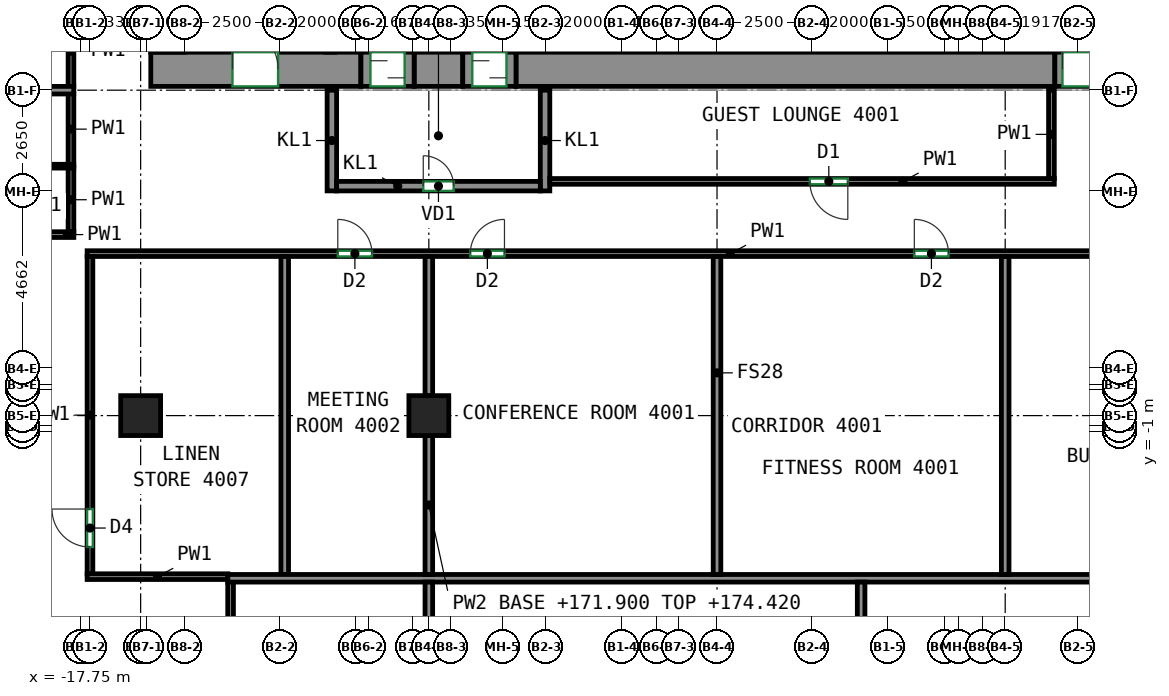
"""IFC4 building model, lengths in metres.
Left out: names, types, materials, properties, quantities, classifications, styles, units other than length and angle.
Written with IfcOpenShell. Run it as: python <this file> out.ifc"""

import sys

from ifc_helpers import new_model, si_unit, direction, frame, frame_2d, origin, origin_2d, place, context, subcontext, project, spatial, rectangle, extrude, source, transform, mapped, element, fill, save


model = new_model("IFC4")
c1 = context("Model", 3, precision=1e-05, world=origin(), true_north=direction((0.0, 1.0)))
c2 = subcontext(c1, "Body", "Model", "MODEL_VIEW")
j1 = project(units=[si_unit("LENGTHUNIT", "METRE"), si_unit("PLANEANGLEUNIT", "RADIAN")], contexts=[c1])
p1 = place(None, origin())
s1 = spatial("IfcSite", under=j1, at=p1, CompositionType="ELEMENT")
p2 = place(p1, origin())
s2 = spatial("IfcBuilding", under=s1, at=p2, CompositionType="ELEMENT")
p3 = place(p2, frame((0.0, 0.0, 171.9)))
s3 = spatial("IfcBuildingStorey", under=s2, at=p3, CompositionType="ELEMENT", Elevation=171.9)
m1 = source(origin(), c2, "Body", "SweptSolid", [
    extrude(rectangle(XDim=1.05, YDim=1.05, at=origin_2d()), origin(), (0.0, 0.0, 1.0), 3.12),
])
for number, where, z_axis, x_axis in (
    (1, (-16.167, -0.562, 0.0), (0.0, 0.0, 1.0), (1.0, 0.0, 0.0)),
    (2, (-8.583, -0.562, 0.0), (0.0, 0.0, 1.0), (1.0, 0.0, 0.0)),
):
    element("IfcColumn", number, at=place(p3, frame(where, z_axis=z_axis, x_axis=x_axis)), inside=s3, PredefinedType="COLUMN", context=c2, shape_type="MappedRepresentation", body=[
        mapped(m1, transform((0.0, 0.0, 0.0))),
    ])
m2 = source(origin(), c2, "Body", "SweptSolid", [
    extrude(rectangle(XDim=5.53, YDim=0.9, at=frame_2d((2.765, 0.0))), origin(), (0.0, 0.0, 1.0), 3.12),
])
p4 = place(p3, frame((-15.9, 8.55, 0.0), z_axis=(0.0, 0.0, 1.0), x_axis=(1.0, 0.0, 0.0)))
e3 = element("IfcWall", 3, at=p4, inside=s3, PredefinedType="SHEAR", context=c2, shape_type="MappedRepresentation", body=[
    mapped(m2, transform((0.0, 0.0, 0.0))),
])
p5 = place(p4, frame((2.15, 0.0, 0.0)))
e4 = element("IfcOpeningElement", 4, at=p5, cuts=e3, PredefinedType="OPENING", context=c2, shape_type="SweptSolid", body=[
    extrude(rectangle(XDim=1.2, YDim=2.1, at=frame_2d((0.6, 1.05))), frame((0.0, 0.46, 0.0), z_axis=(0.0, -1.0, 0.0), x_axis=(1.0, 0.0, 0.0)), (0.0, 0.0, 1.0), 0.92),
])
m3 = source(origin(), c2, "Body", "SweptSolid", [
    extrude(rectangle(XDim=1.28, YDim=0.9, at=frame_2d((0.64, 0.0))), origin(), (0.0, 0.0, 1.0), 3.12),
])
p6 = place(p3, frame((-8.97, 8.55, 0.0), z_axis=(0.0, 0.0, 1.0), x_axis=(1.0, 0.0, 0.0)))
e5 = element("IfcWall", 5, at=p6, inside=s3, PredefinedType="SHEAR", context=c2, shape_type="MappedRepresentation", body=[
    mapped(m3, transform((0.0, 0.0, 0.0))),
])
m4 = source(origin(), c2, "Body", "SweptSolid", [
    extrude(rectangle(XDim=14.18, YDim=0.9, at=frame_2d((7.09, 0.0))), origin(), (0.0, 0.0, 1.0), 3.12),
])
p7 = place(p3, frame((-6.29, 8.55, 0.0), z_axis=(0.0, 0.0, 1.0), x_axis=(1.0, 0.0, 0.0)))
e6 = element("IfcWall", 6, at=p7, inside=s3, PredefinedType="SHEAR", context=c2, shape_type="MappedRepresentation", body=[
    mapped(m4, transform((0.0, 0.0, 0.0))),
])
m5 = source(origin(), c2, "Body", "SweptSolid", [
    extrude(rectangle(XDim=2.65, YDim=0.25, at=frame_2d((1.325, 0.0))), origin(), (0.0, 0.0, 1.0), 3.12),
])
for number, where, z_axis, x_axis in (
    (7, (-11.135, 5.35, 0.0), (0.0, 0.0, 1.0), (0.0, 1.0, 0.0)),
    (8, (-5.525, 5.35, 0.0), (0.0, 0.0, 1.0), (0.0, 1.0, 0.0)),
):
    element("IfcWall", number, at=place(p3, frame(where, z_axis=z_axis, x_axis=x_axis)), inside=s3, PredefinedType="PARTITIONING", context=c2, shape_type="MappedRepresentation", body=[
        mapped(m5, transform((0.0, 0.0, 0.0))),
    ])
m6 = source(origin(), c2, "Body", "SweptSolid", [
    extrude(rectangle(XDim=5.36, YDim=0.25, at=frame_2d((2.68, 0.0))), origin(), (0.0, 0.0, 1.0), 3.12),
])
p8 = place(p3, frame((-11.01, 5.475, 0.0), z_axis=(0.0, 0.0, 1.0), x_axis=(1.0, 0.0, 0.0)))
e9 = element("IfcWall", 9, at=p8, inside=s3, PredefinedType="PARTITIONING", context=c2, shape_type="MappedRepresentation", body=[
    mapped(m6, transform((0.0, 0.0, 0.0))),
])
p9 = place(p8, frame((2.28, 0.0, 0.0)))
e10 = element("IfcOpeningElement", 10, at=p9, cuts=e9, PredefinedType="OPENING", context=c2, shape_type="SweptSolid", body=[
    extrude(rectangle(XDim=0.8, YDim=2.0, at=frame_2d((0.4, 1.0))), frame((0.0, 0.135, 0.0), z_axis=(0.0, -1.0, 0.0), x_axis=(1.0, 0.0, 0.0)), (0.0, 0.0, 1.0), 0.27),
])
m7 = source(origin(), c2, "Body", "SweptSolid", [
    extrude(rectangle(XDim=1.4, YDim=0.9, at=frame_2d((0.7, 0.0))), origin(), (0.0, 0.0, 1.0), 2.7),
])
p10 = place(p3, frame((-10.37, 8.55, 0.0), z_axis=(0.0, 0.0, 1.0), x_axis=(1.0, 0.0, 0.0)))
e11 = element("IfcWall", 11, at=p10, inside=s3, PredefinedType="PARTITIONING", context=c2, shape_type="MappedRepresentation", body=[
    mapped(m7, transform((0.0, 0.0, 0.0))),
])
p11 = place(p10, frame((0.25, 0.0, 0.0)))
e12 = element("IfcOpeningElement", 12, at=p11, cuts=e11, PredefinedType="OPENING", context=c2, shape_type="SweptSolid", body=[
    extrude(rectangle(XDim=0.9, YDim=2.1, at=frame_2d((0.45, 1.05))), frame((0.0, 0.46, 0.0), z_axis=(0.0, -1.0, 0.0), x_axis=(1.0, 0.0, 0.0)), (0.0, 0.0, 1.0), 0.92),
])
m8 = source(origin(), c2, "Body", "SweptSolid", [
    extrude(rectangle(XDim=1.4, YDim=0.9, at=frame_2d((0.7, 0.0))), origin(), (0.0, 0.0, 1.0), 2.7),
])
p12 = place(p3, frame((-7.69, 8.55, 0.0), z_axis=(0.0, 0.0, 1.0), x_axis=(1.0, 0.0, 0.0)))
e13 = element("IfcWall", 13, at=p12, inside=s3, PredefinedType="PARTITIONING", context=c2, shape_type="MappedRepresentation", body=[
    mapped(m8, transform((0.0, 0.0, 0.0))),
])
p13 = place(p12, frame((0.25, 0.0, 0.0)))
e14 = element("IfcOpeningElement", 14, at=p13, cuts=e13, PredefinedType="OPENING", context=c2, shape_type="SweptSolid", body=[
    extrude(rectangle(XDim=0.9, YDim=2.1, at=frame_2d((0.45, 1.05))), frame((0.0, 0.46, 0.0), z_axis=(0.0, -1.0, 0.0), x_axis=(1.0, 0.0, 0.0)), (0.0, 0.0, 1.0), 0.92),
])
m9 = source(origin(), c2, "Body", "SweptSolid", [
    extrude(rectangle(XDim=2.4, YDim=0.9, at=frame_2d((1.2, 0.0))), origin(), (0.0, 0.0, 1.0), 2.7),
])
p14 = place(p3, frame((7.89, 8.55, 0.0), z_axis=(0.0, 0.0, 1.0), x_axis=(1.0, 0.0, 0.0)))
e15 = element("IfcWall", 15, at=p14, inside=s3, PredefinedType="PARTITIONING", context=c2, shape_type="MappedRepresentation", body=[
    mapped(m9, transform((0.0, 0.0, 0.0))),
])
p15 = place(p14, frame((0.2, 0.0, 0.0)))
e16 = element("IfcOpeningElement", 16, at=p15, cuts=e15, PredefinedType="OPENING", context=c2, shape_type="SweptSolid", body=[
    extrude(rectangle(XDim=2.0, YDim=2.1, at=frame_2d((1.0, 1.05))), frame((0.0, 0.46, 0.0), z_axis=(0.0, -1.0, 0.0), x_axis=(1.0, 0.0, 0.0)), (0.0, 0.0, 1.0), 0.92),
])
p16 = place(p3, frame((-17.925, 4.2, 0.0), z_axis=(0.0, 0.0, 1.0), x_axis=(-1.0, 0.0, 0.0)))
e17 = element("IfcWall", 17, at=p16, inside=s3, PredefinedType="PARTITIONING", context=c2, shape_type="SweptSolid", body=[
    extrude(rectangle(XDim=2.109, YDim=0.15, at=frame_2d((1.054, 0.0))), origin(), (0.0, 0.0, 1.0), 3.12),
])
p17 = place(p16, frame((0.706, 0.0, 0.0)))
e18 = element("IfcOpeningElement", 18, at=p17, cuts=e17, PredefinedType="OPENING", context=c2, shape_type="SweptSolid", body=[
    extrude(rectangle(XDim=1.0, YDim=2.1, at=frame_2d((0.5, 1.05))), frame((0.0, 0.085, 0.0), z_axis=(0.0, -1.0, 0.0), x_axis=(1.0, 0.0, 0.0)), (0.0, 0.0, 1.0), 0.17),
])
p18 = place(p3, frame((-18.0, 4.275, 0.0), z_axis=(0.0, 0.0, 1.0), x_axis=(0.0, 1.0, 0.0)))
e19 = element("IfcWall", 19, at=p18, inside=s3, PredefinedType="PARTITIONING", context=c2, shape_type="SweptSolid", body=[
    extrude(rectangle(XDim=1.685, YDim=0.15, at=frame_2d((0.843, 0.0))), origin(), (0.0, 0.0, 1.0), 3.12),
])
for number, where, z_axis, x_axis in (
    (20, (-18.0, 6.04, 0.0), (0.0, 0.0, 1.0), (0.0, 1.0, 0.0)),
    (21, (-18.0, 8.09, 0.0), (0.0, 0.0, 1.0), (0.0, 1.0, 0.0)),
):
    element("IfcWall", number, at=place(p3, frame(where, z_axis=z_axis, x_axis=x_axis)), inside=s3, PredefinedType="PARTITIONING", context=c2, shape_type="SweptSolid", body=[
        extrude(rectangle(XDim=1.87, YDim=0.15, at=frame_2d((0.935, 0.0))), origin(), (0.0, 0.0, 1.0), 3.12),
    ])
p19 = place(p3, frame((7.875, 5.6, 0.0), z_axis=(0.0, 0.0, 1.0), x_axis=(-1.0, 0.0, 0.0)))
e22 = element("IfcWall", 22, at=p19, inside=s3, PredefinedType="PARTITIONING", context=c2, shape_type="SweptSolid", body=[
    extrude(rectangle(XDim=13.275, YDim=0.15, at=frame_2d((6.637, 0.0))), origin(), (0.0, 0.0, 1.0), 3.12),
])
p20 = place(p19, frame((5.433, 0.0, 0.0)))
e23 = element("IfcOpeningElement", 23, at=p20, cuts=e22, PredefinedType="OPENING", context=c2, shape_type="SweptSolid", body=[
    extrude(rectangle(XDim=1.0, YDim=2.1, at=frame_2d((0.5, 1.05))), frame((0.0, 0.085, 0.0), z_axis=(0.0, -1.0, 0.0), x_axis=(1.0, 0.0, 0.0)), (0.0, 0.0, 1.0), 0.17),
])
p21 = place(p3, frame((7.8, 8.0, 0.0), z_axis=(0.0, 0.0, 1.0), x_axis=(0.0, -1.0, 0.0)))
e24 = element("IfcWall", 24, at=p21, inside=s3, PredefinedType="PARTITIONING", context=c2, shape_type="SweptSolid", body=[
    extrude(rectangle(XDim=2.325, YDim=0.15, at=frame_2d((1.163, 0.0))), origin(), (0.0, 0.0, 1.0), 3.12),
])
p22 = place(p3, frame((-17.575, 3.7, 0.0), z_axis=(0.0, 0.0, 1.0), x_axis=(1.0, 0.0, 0.0)))
e25 = element("IfcWall", 25, at=p22, inside=s3, PredefinedType="PARTITIONING", context=c2, shape_type="SweptSolid", body=[
    extrude(rectangle(XDim=33.85, YDim=0.15, at=frame_2d((16.925, 0.0))), origin(), (0.0, 0.0, 1.0), 3.12),
])
p23 = place(p22, frame((6.596, 0.0, 0.0)))
e26 = element("IfcOpeningElement", 26, at=p23, cuts=e25, PredefinedType="OPENING", context=c2, shape_type="SweptSolid", body=[
    extrude(rectangle(XDim=0.9, YDim=2.1, at=frame_2d((0.45, 1.05))), frame((0.0, 0.085, 0.0), z_axis=(0.0, -1.0, 0.0), x_axis=(1.0, 0.0, 0.0)), (0.0, 0.0, 1.0), 0.17),
])
p24 = place(p22, frame((10.082, 0.0, 0.0)))
e27 = element("IfcOpeningElement", 27, at=p24, cuts=e25, PredefinedType="OPENING", context=c2, shape_type="SweptSolid", body=[
    extrude(rectangle(XDim=0.9, YDim=2.1, at=frame_2d((0.45, 1.05))), frame((0.0, 0.085, 0.0), z_axis=(0.0, -1.0, 0.0), x_axis=(1.0, 0.0, 0.0)), (0.0, 0.0, 1.0), 0.17),
])
p25 = place(p22, frame((21.767, 0.0, 0.0)))
e28 = element("IfcOpeningElement", 28, at=p25, cuts=e25, PredefinedType="OPENING", context=c2, shape_type="SweptSolid", body=[
    extrude(rectangle(XDim=0.9, YDim=2.1, at=frame_2d((0.45, 1.05))), frame((0.0, 0.085, 0.0), z_axis=(0.0, -1.0, 0.0), x_axis=(1.0, 0.0, 0.0)), (0.0, 0.0, 1.0), 0.17),
])
p26 = place(p22, frame((29.649, 0.0, 0.0)))
e29 = element("IfcOpeningElement", 29, at=p26, cuts=e25, PredefinedType="OPENING", context=c2, shape_type="SweptSolid", body=[
    extrude(rectangle(XDim=0.9, YDim=2.1, at=frame_2d((0.45, 1.05))), frame((0.0, 0.085, 0.0), z_axis=(0.0, -1.0, 0.0), x_axis=(1.0, 0.0, 0.0)), (0.0, 0.0, 1.0), 0.17),
])
p27 = place(p3, frame((-17.5, -4.725, 0.0), z_axis=(0.0, 0.0, 1.0), x_axis=(0.0, 1.0, 0.0)))
e30 = element("IfcWall", 30, at=p27, inside=s3, PredefinedType="PARTITIONING", context=c2, shape_type="SweptSolid", body=[
    extrude(rectangle(XDim=8.35, YDim=0.15, at=frame_2d((4.175, 0.0))), origin(), (0.0, 0.0, 1.0), 3.12),
])
p28 = place(p27, frame((0.704, 0.0, 0.0)))
e31 = element("IfcOpeningElement", 31, at=p28, cuts=e30, PredefinedType="OPENING", context=c2, shape_type="SweptSolid", body=[
    extrude(rectangle(XDim=1.0, YDim=2.1, at=frame_2d((0.5, 1.05))), frame((0.0, 0.085, 0.0), z_axis=(0.0, -1.0, 0.0), x_axis=(1.0, 0.0, 0.0)), (0.0, 0.0, 1.0), 0.17),
])
p29 = place(p3, frame((-17.575, -4.8, 0.0), z_axis=(0.0, 0.0, 1.0), x_axis=(1.0, 0.0, 0.0)))
e32 = element("IfcWall", 32, at=p29, inside=s3, PredefinedType="PARTITIONING", context=c2, shape_type="SweptSolid", body=[
    extrude(rectangle(XDim=3.702, YDim=0.15, at=frame_2d((1.851, 0.0))), origin(), (0.0, 0.0, 1.0), 3.12),
])
p30 = place(p3, frame((-13.8, -7.75, 0.0), z_axis=(0.0, 0.0, 1.0), x_axis=(0.0, 1.0, 0.0)))
e33 = element("IfcWall", 33, at=p30, inside=s3, PredefinedType="PARTITIONING", context=c2, shape_type="SweptSolid", body=[
    extrude(rectangle(XDim=2.817, YDim=0.15, at=frame_2d((1.408, 0.0))), origin(), (0.0, 0.0, 1.0), 3.12),
])
p31 = place(p3, frame((-17.927, 6.0, 0.0), z_axis=(0.0, 0.0, 1.0), x_axis=(-1.0, 0.0, 0.0)))
e34 = element("IfcWall", 34, at=p31, inside=s3, PredefinedType="PARTITIONING", context=c2, shape_type="SweptSolid", body=[
    extrude(rectangle(XDim=2.825, YDim=0.1, at=frame_2d((1.413, 0.0))), origin(), (0.0, 0.0, 1.0), 3.12),
])
p32 = place(p31, frame((1.522, 0.0, 0.0)))
e35 = element("IfcOpeningElement", 35, at=p32, cuts=e34, PredefinedType="OPENING", context=c2, shape_type="SweptSolid", body=[
    extrude(rectangle(XDim=0.9, YDim=2.1, at=frame_2d((0.45, 1.05))), frame((0.0, 0.06, 0.0), z_axis=(0.0, -1.0, 0.0), x_axis=(1.0, 0.0, 0.0)), (0.0, 0.0, 1.0), 0.12),
])
p33 = place(p3, frame((-26.4, 8.0, 0.0), z_axis=(0.0, 0.0, 1.0), x_axis=(1.0, 0.0, 0.0)))
e36 = element("IfcWall", 36, at=p33, inside=s3, PredefinedType="PARTITIONING", context=c2, shape_type="SweptSolid", body=[
    extrude(rectangle(XDim=8.473, YDim=0.2, at=frame_2d((4.236, 0.0))), origin(), (0.0, 0.0, 1.0), 3.12),
])
p34 = place(p3, frame((-12.375, -4.743, 0.0), z_axis=(0.0, 0.0, 1.0), x_axis=(0.0, 1.0, 0.0)))
e37 = element("IfcWall", 37, at=p34, inside=s3, PredefinedType="PARTITIONING", context=c2, shape_type="SweptSolid", body=[
    extrude(rectangle(XDim=8.366, YDim=0.2, at=frame_2d((4.183, 0.0))), origin(), (0.0, 0.0, 1.0), 3.12),
])
p35 = place(p3, frame((-13.873, -4.843, 0.0), z_axis=(0.0, 0.0, 1.0), x_axis=(1.0, 0.0, 0.0)))
e38 = element("IfcWall", 38, at=p35, inside=s3, PredefinedType="PARTITIONING", context=c2, shape_type="SweptSolid", body=[
    extrude(rectangle(XDim=30.146, YDim=0.2, at=frame_2d((15.073, 0.0))), origin(), (0.0, 0.0, 1.0), 3.12),
])
p36 = place(p3, frame((-8.583, -0.037, 0.0), z_axis=(0.0, 0.0, 1.0), x_axis=(0.0, 1.0, 0.0)))
e39 = element("IfcWall", 39, at=p36, inside=s3, PredefinedType="PARTITIONING", context=c2, shape_type="SweptSolid", body=[
    extrude(rectangle(XDim=3.66, YDim=0.2, at=frame_2d((1.83, 0.0))), origin(), (0.0, 0.0, 1.0), 3.12),
])
p37 = place(p3, frame((-8.583, -4.743, 0.0), z_axis=(0.0, 0.0, 1.0), x_axis=(0.0, 1.0, 0.0)))
e40 = element("IfcWall", 40, at=p37, inside=s3, PredefinedType="PARTITIONING", context=c2, shape_type="SweptSolid", body=[
    extrude(rectangle(XDim=3.656, YDim=0.2, at=frame_2d((1.828, 0.0))), origin(), (0.0, 0.0, 1.0), 2.52),
])
for number, where, z_axis, x_axis in (
    (41, (-1.0, -4.743, 0.0), (0.0, 0.0, 1.0), (0.0, 1.0, 0.0)),
    (42, (6.583, -4.743, 0.0), (0.0, 0.0, 1.0), (0.0, 1.0, 0.0)),
):
    element("IfcWall", number, at=place(p3, frame(where, z_axis=z_axis, x_axis=x_axis)), inside=s3, PredefinedType="PARTITIONING", context=c2, shape_type="SweptSolid", body=[
        extrude(rectangle(XDim=8.366, YDim=0.2, at=frame_2d((4.183, 0.0))), origin(), (0.0, 0.0, 1.0), 3.12),
    ])
p38 = place(p3, frame((-8.583, -8.6, 0.0), z_axis=(0.0, 0.0, 1.0), x_axis=(0.0, 1.0, 0.0)))
e43 = element("IfcWall", 43, at=p38, inside=s3, PredefinedType="PARTITIONING", context=c2, shape_type="SweptSolid", body=[
    extrude(rectangle(XDim=3.657, YDim=0.2, at=frame_2d((1.829, 0.0))), origin(), (0.0, 0.0, 1.0), 2.52),
])
p39 = place(p3, frame((2.792, -15.423, 0.0), z_axis=(0.0, 0.0, 1.0), x_axis=(0.0, 1.0, 0.0)))
e44 = element("IfcWall", 44, at=p39, inside=s3, PredefinedType="PARTITIONING", context=c2, shape_type="SweptSolid", body=[
    extrude(rectangle(XDim=10.48, YDim=0.2, at=frame_2d((5.24, 0.0))), origin(), (0.0, 0.0, 1.0), 3.12),
])
p40 = place(p15, origin())
e45 = element("IfcDoor", 45, at=p40, inside=s3, OperationType="DOUBLE_DOOR_SINGLE_SWING", PredefinedType="DOOR", context=c2, shape_type="SweptSolid", body=[
    extrude(rectangle(XDim=2.0, YDim=2.1, at=frame_2d((1.0, 1.05))), frame((0.0, 0.355, 0.0), z_axis=(0.0, -1.0, 0.0), x_axis=(1.0, 0.0, 0.0)), (0.0, 0.0, 1.0), 0.05),
])
fill(e16, e45)
p41 = place(p9, origin())
e46 = element("IfcDoor", 46, at=p41, inside=s3, OperationType="SINGLE_SWING_LEFT", PredefinedType="DOOR", context=c2, shape_type="SweptSolid", body=[
    extrude(rectangle(XDim=0.8, YDim=2.0, at=frame_2d((0.4, 1.0))), frame((0.0, 0.025, 0.0), z_axis=(0.0, -1.0, 0.0), x_axis=(1.0, 0.0, 0.0)), (0.0, 0.0, 1.0), 0.05),
])
fill(e10, e46)
p42 = place(p11, origin())
e47 = element("IfcDoor", 47, at=p42, inside=s3, OperationType="SLIDING_TO_LEFT", PredefinedType="DOOR", context=c2, shape_type="SweptSolid", body=[
    extrude(rectangle(XDim=0.9, YDim=2.1, at=frame_2d((0.45, 1.05))), frame((0.0, 0.355, 0.0), z_axis=(0.0, -1.0, 0.0), x_axis=(1.0, 0.0, 0.0)), (0.0, 0.0, 1.0), 0.05),
])
fill(e12, e47)
p43 = place(p13, origin())
e48 = element("IfcDoor", 48, at=p43, inside=s3, OperationType="SLIDING_TO_RIGHT", PredefinedType="DOOR", context=c2, shape_type="SweptSolid", body=[
    extrude(rectangle(XDim=0.9, YDim=2.1, at=frame_2d((0.45, 1.05))), frame((0.0, 0.355, 0.0), z_axis=(0.0, -1.0, 0.0), x_axis=(1.0, 0.0, 0.0)), (0.0, 0.0, 1.0), 0.05),
])
fill(e14, e48)
p44 = place(p5, origin())
e49 = element("IfcDoor", 49, at=p44, inside=s3, OperationType="DOUBLE_DOOR_SINGLE_SWING", PredefinedType="DOOR", context=c2, shape_type="SweptSolid", body=[
    extrude(rectangle(XDim=1.2, YDim=2.1, at=frame_2d((0.6, 1.05))), frame((0.0, 0.355, 0.0), z_axis=(0.0, -1.0, 0.0), x_axis=(1.0, 0.0, 0.0)), (0.0, 0.0, 1.0), 0.05),
])
fill(e4, e49)
p45 = place(p28, origin())
e50 = element("IfcDoor", 50, at=p45, inside=s3, OperationType="SINGLE_SWING_RIGHT", PredefinedType="DOOR", context=c2, shape_type="SweptSolid", body=[
    extrude(rectangle(XDim=1.0, YDim=2.1, at=frame_2d((0.5, 1.05))), frame((0.0, 0.025, 0.0), z_axis=(0.0, -1.0, 0.0), x_axis=(1.0, 0.0, 0.0)), (0.0, 0.0, 1.0), 0.05),
])
fill(e31, e50)
p46 = place(p23, origin())
e51 = element("IfcDoor", 51, at=p46, inside=s3, OperationType="SINGLE_SWING_LEFT", PredefinedType="DOOR", context=c2, shape_type="SweptSolid", body=[
    extrude(rectangle(XDim=0.9, YDim=2.1, at=frame_2d((0.45, 1.05))), frame((0.0, 0.025, 0.0), z_axis=(0.0, -1.0, 0.0), x_axis=(1.0, 0.0, 0.0)), (0.0, 0.0, 1.0), 0.05),
])
fill(e26, e51)
p47 = place(p24, origin())
e52 = element("IfcDoor", 52, at=p47, inside=s3, OperationType="SINGLE_SWING_RIGHT", PredefinedType="DOOR", context=c2, shape_type="SweptSolid", body=[
    extrude(rectangle(XDim=0.9, YDim=2.1, at=frame_2d((0.45, 1.05))), frame((0.0, 0.025, 0.0), z_axis=(0.0, -1.0, 0.0), x_axis=(1.0, 0.0, 0.0)), (0.0, 0.0, 1.0), 0.05),
])
fill(e27, e52)
p48 = place(p25, origin())
e53 = element("IfcDoor", 53, at=p48, inside=s3, OperationType="SINGLE_SWING_LEFT", PredefinedType="DOOR", context=c2, shape_type="SweptSolid", body=[
    extrude(rectangle(XDim=0.9, YDim=2.1, at=frame_2d((0.45, 1.05))), frame((0.0, 0.025, 0.0), z_axis=(0.0, -1.0, 0.0), x_axis=(1.0, 0.0, 0.0)), (0.0, 0.0, 1.0), 0.05),
])
fill(e28, e53)
p49 = place(p20, origin())
e54 = element("IfcDoor", 54, at=p49, inside=s3, OperationType="SINGLE_SWING_LEFT", PredefinedType="DOOR", context=c2, shape_type="SweptSolid", body=[
    extrude(rectangle(XDim=1.0, YDim=2.1, at=frame_2d((0.5, 1.05))), frame((0.0, 0.025, 0.0), z_axis=(0.0, -1.0, 0.0), x_axis=(1.0, 0.0, 0.0)), (0.0, 0.0, 1.0), 0.05),
])
fill(e23, e54)
save(model, sys.argv[1])
